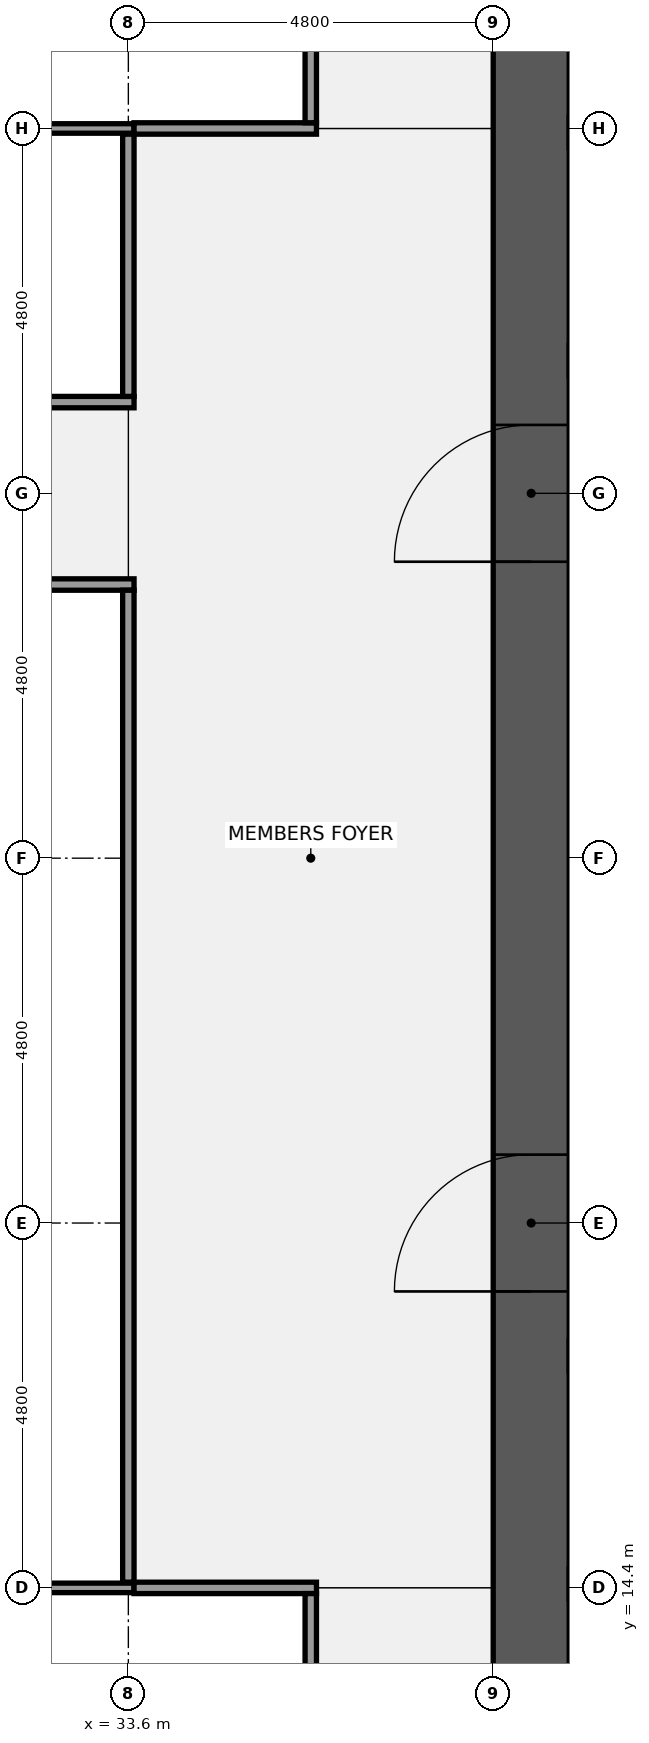
"""IFC4 building model, lengths in metres.
Left out: names, types, materials, properties, quantities, classifications, styles, units other than length and angle.
Written with IfcOpenShell. Run it as: python <this file> out.ifc"""

import sys

from ifc_helpers import new_model, si_unit, direction, frame, frame_2d, origin, place, context, subcontext, project, spatial, rectangle, extrude, element, fill, save


model = new_model("IFC4")
c1 = context("Model", 3, precision=1e-05, world=origin(), true_north=direction((0.0, 1.0)))
c2 = subcontext(c1, "Body", "Model", "MODEL_VIEW")
j1 = project(units=[si_unit("LENGTHUNIT", "METRE"), si_unit("PLANEANGLEUNIT", "RADIAN")], contexts=[c1])
p1 = place(None, origin())
s1 = spatial("IfcSite", under=j1, at=p1, CompositionType="ELEMENT")
p2 = place(p1, origin())
s2 = spatial("IfcBuilding", under=s1, at=p2, CompositionType="ELEMENT")
p3 = place(p2, frame((0.0, 0.0, 172.1)))
s3 = spatial("IfcBuildingStorey", under=s2, at=p3, CompositionType="ELEMENT", Elevation=172.1)
p4 = place(p3, frame((38.9, 9.6, 0.0), z_axis=(0.0, 0.0, 1.0), x_axis=(0.0, 1.0, 0.0)))
e1 = element("IfcWall", 1, at=p4, inside=s3, PredefinedType="SHEAR", context=c2, shape_type="SweptSolid", body=[
    extrude(rectangle(XDim=28.8, YDim=1.0, at=frame_2d((14.4, 0.0))), origin(), (0.0, 0.0, 1.0), 3.7),
])
p5 = place(p4, frame((8.7, 0.0, 0.0)))
e2 = element("IfcOpeningElement", 2, at=p5, cuts=e1, PredefinedType="OPENING", context=c2, shape_type="SweptSolid", body=[
    extrude(rectangle(XDim=1.8, YDim=2.1, at=frame_2d((0.9, 1.05))), frame((0.0, 0.51, 0.0), z_axis=(0.0, -1.0, 0.0), x_axis=(1.0, 0.0, 0.0)), (0.0, 0.0, 1.0), 1.02),
])
p6 = place(p4, frame((18.3, 0.0, 0.0)))
e3 = element("IfcOpeningElement", 3, at=p6, cuts=e1, PredefinedType="OPENING", context=c2, shape_type="SweptSolid", body=[
    extrude(rectangle(XDim=1.8, YDim=2.1, at=frame_2d((0.9, 1.05))), frame((0.0, 0.51, 0.0), z_axis=(0.0, -1.0, 0.0), x_axis=(1.0, 0.0, 0.0)), (0.0, 0.0, 1.0), 1.02),
])
p7 = place(p3, frame((24.075, 14.4, 0.0), z_axis=(0.0, 0.0, 1.0), x_axis=(1.0, 0.0, 0.0)))
e4 = element("IfcWall", 4, at=p7, inside=s3, PredefinedType="PARTITIONING", context=c2, shape_type="SweptSolid", body=[
    extrude(rectangle(XDim=9.6, YDim=0.125, at=frame_2d((4.8, 0.0))), origin(), (0.0, 0.0, 1.0), 2.709),
])
p8 = place(p3, frame((33.675, 14.4, 0.0), z_axis=(0.0, 0.0, 1.0), x_axis=(1.0, 0.0, 0.0)))
e5 = element("IfcWall", 5, at=p8, inside=s3, PredefinedType="PARTITIONING", context=c2, shape_type="SweptSolid", body=[
    extrude(rectangle(XDim=2.4, YDim=0.15, at=frame_2d((1.2, 0.0))), origin(), (0.0, 0.0, 1.0), 2.709),
])
p9 = place(p3, frame((23.925, 27.6, 0.0), z_axis=(0.0, 0.0, 1.0), x_axis=(1.0, 0.0, 0.0)))
e6 = element("IfcWall", 6, at=p9, inside=s3, PredefinedType="PARTITIONING", context=c2, shape_type="SweptSolid", body=[
    extrude(rectangle(XDim=9.75, YDim=0.15, at=frame_2d((4.875, 0.0))), origin(), (0.0, 0.0, 1.0), 2.709),
])
p10 = place(p3, frame((23.925, 30.0, 0.0), z_axis=(0.0, 0.0, 1.0), x_axis=(1.0, 0.0, 0.0)))
e7 = element("IfcWall", 7, at=p10, inside=s3, PredefinedType="PARTITIONING", context=c2, shape_type="SweptSolid", body=[
    extrude(rectangle(XDim=9.75, YDim=0.15, at=frame_2d((4.875, 0.0))), origin(), (0.0, 0.0, 1.0), 2.709),
])
p11 = place(p10, frame((4.375, 0.0, 0.0)))
e8 = element("IfcOpeningElement", 8, at=p11, cuts=e7, PredefinedType="OPENING", context=c2, shape_type="SweptSolid", body=[
    extrude(rectangle(XDim=1.0, YDim=2.1, at=frame_2d((0.5, 1.05))), frame((0.0, 0.085, 0.0), z_axis=(0.0, -1.0, 0.0), x_axis=(1.0, 0.0, 0.0)), (0.0, 0.0, 1.0), 0.17),
])
p12 = place(p3, frame((24.075, 33.6, 0.0), z_axis=(0.0, 0.0, 1.0), x_axis=(1.0, 0.0, 0.0)))
e9 = element("IfcWall", 9, at=p12, inside=s3, PredefinedType="PARTITIONING", context=c2, shape_type="SweptSolid", body=[
    extrude(rectangle(XDim=9.6, YDim=0.125, at=frame_2d((4.8, 0.0))), origin(), (0.0, 0.0, 1.0), 2.709),
])
p13 = place(p3, frame((33.675, 33.6, 0.0), z_axis=(0.0, 0.0, 1.0), x_axis=(1.0, 0.0, 0.0)))
e10 = element("IfcWall", 10, at=p13, inside=s3, PredefinedType="PARTITIONING", context=c2, shape_type="SweptSolid", body=[
    extrude(rectangle(XDim=2.4, YDim=0.15, at=frame_2d((1.2, 0.0))), origin(), (0.0, 0.0, 1.0), 2.709),
])
p14 = place(p3, frame((33.6, 14.475, 0.0), z_axis=(0.0, 0.0, 1.0), x_axis=(0.0, 1.0, 0.0)))
e11 = element("IfcWall", 11, at=p14, inside=s3, PredefinedType="PARTITIONING", context=c2, shape_type="SweptSolid", body=[
    extrude(rectangle(XDim=13.05, YDim=0.15, at=frame_2d((6.525, 0.0))), origin(), (0.0, 0.0, 1.0), 2.709),
])
p15 = place(p3, frame((33.6, 30.075, 0.0), z_axis=(0.0, 0.0, 1.0), x_axis=(0.0, 1.0, 0.0)))
e12 = element("IfcWall", 12, at=p15, inside=s3, PredefinedType="PARTITIONING", context=c2, shape_type="SweptSolid", body=[
    extrude(rectangle(XDim=3.45, YDim=0.15, at=frame_2d((1.725, 0.0))), origin(), (0.0, 0.0, 1.0), 2.709),
])
for number, where, z_axis, x_axis in (
    (13, (36.0, 9.675, 0.0), (0.0, 0.0, 1.0), (0.0, 1.0, 0.0)),
    (14, (36.0, 33.675, 0.0), (0.0, 0.0, 1.0), (0.0, 1.0, 0.0)),
):
    element("IfcWall", number, at=place(p3, frame(where, z_axis=z_axis, x_axis=x_axis)), inside=s3, PredefinedType="PARTITIONING", context=c2, shape_type="SweptSolid", body=[
        extrude(rectangle(XDim=4.65, YDim=0.15, at=frame_2d((2.325, 0.0))), origin(), (0.0, 0.0, 1.0), 2.709),
    ])
p16 = place(p5, origin())
e15 = element("IfcDoor", 15, at=p16, inside=s3, OperationType="DOUBLE_DOOR_SINGLE_SWING", PredefinedType="DOOR", context=c2, shape_type="SweptSolid", body=[
    extrude(rectangle(XDim=1.8, YDim=2.1, at=frame_2d((0.9, 1.05))), frame((0.0, 0.025, 0.0), z_axis=(0.0, -1.0, 0.0), x_axis=(1.0, 0.0, 0.0)), (0.0, 0.0, 1.0), 0.05),
])
fill(e2, e15)
p17 = place(p6, origin())
e16 = element("IfcDoor", 16, at=p17, inside=s3, OperationType="DOUBLE_DOOR_SINGLE_SWING", PredefinedType="DOOR", context=c2, shape_type="SweptSolid", body=[
    extrude(rectangle(XDim=1.8, YDim=2.1, at=frame_2d((0.9, 1.05))), frame((0.0, 0.025, 0.0), z_axis=(0.0, -1.0, 0.0), x_axis=(1.0, 0.0, 0.0)), (0.0, 0.0, 1.0), 0.05),
])
fill(e3, e16)
save(model, sys.argv[1])
